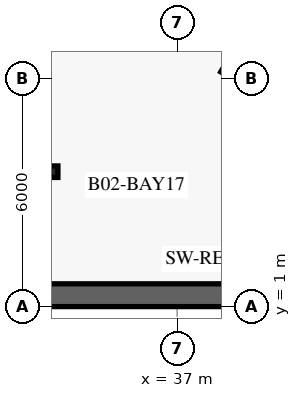
"""IFC4 building model, lengths in metres.
Left out: names, types, materials, properties, quantities, classifications, styles, units other than length and angle.
Written with IfcOpenShell. Run it as: python <this file> out.ifc"""

import sys

from ifc_helpers import new_model, si_unit, direction, frame, frame_2d, origin, origin_2d, place, context, subcontext, project, spatial, rectangle, i_section, extrude, element, save


model = new_model("IFC4")
c1 = context("Model", 3, precision=1e-05, world=origin(), true_north=direction((0.0, 1.0)))
c2 = subcontext(c1, "Body", "Model", "MODEL_VIEW")
j1 = project(units=[si_unit("LENGTHUNIT", "METRE"), si_unit("PLANEANGLEUNIT", "RADIAN")], contexts=[c1])
p1 = place(None, origin())
s1 = spatial("IfcSite", under=j1, at=p1, CompositionType="ELEMENT")
p2 = place(p1, origin())
s2 = spatial("IfcBuilding", under=s1, at=p2, CompositionType="ELEMENT")
p3 = place(p2, frame((0.0, 0.0, -8.4)))
s3 = spatial("IfcBuildingStorey", under=s2, at=p3, CompositionType="ELEMENT", Elevation=-8.4)
p4 = place(p3, frame((1.0, 1.3, 0.0), z_axis=(0.0, 0.0, 1.0), x_axis=(1.0, 0.0, 0.0)))
e1 = element("IfcWall", 1, at=p4, inside=s3, PredefinedType="USERDEFINED", context=c2, shape_type="SweptSolid", body=[
    extrude(rectangle(XDim=74.0, YDim=0.6, at=frame_2d((37.0, 0.0))), origin(), (0.0, 0.0, 1.0), 3.88),
])
p5 = place(p3, frame((38.531, 7.536, 0.0), z_axis=(0.0, 0.0, 1.0), x_axis=(0.5, 0.866025403784, 0.0)))
e2 = element("IfcColumn", 2, at=p5, inside=s3, PredefinedType="COLUMN", context=c2, shape_type="SweptSolid", body=[
    extrude(i_section(OverallWidth=0.302, OverallDepth=1.008, WebThickness=0.021, FlangeThickness=0.04, at=origin_2d()), origin(), (0.0, 0.0, 1.0), 4.2),
])
save(model, sys.argv[1])
